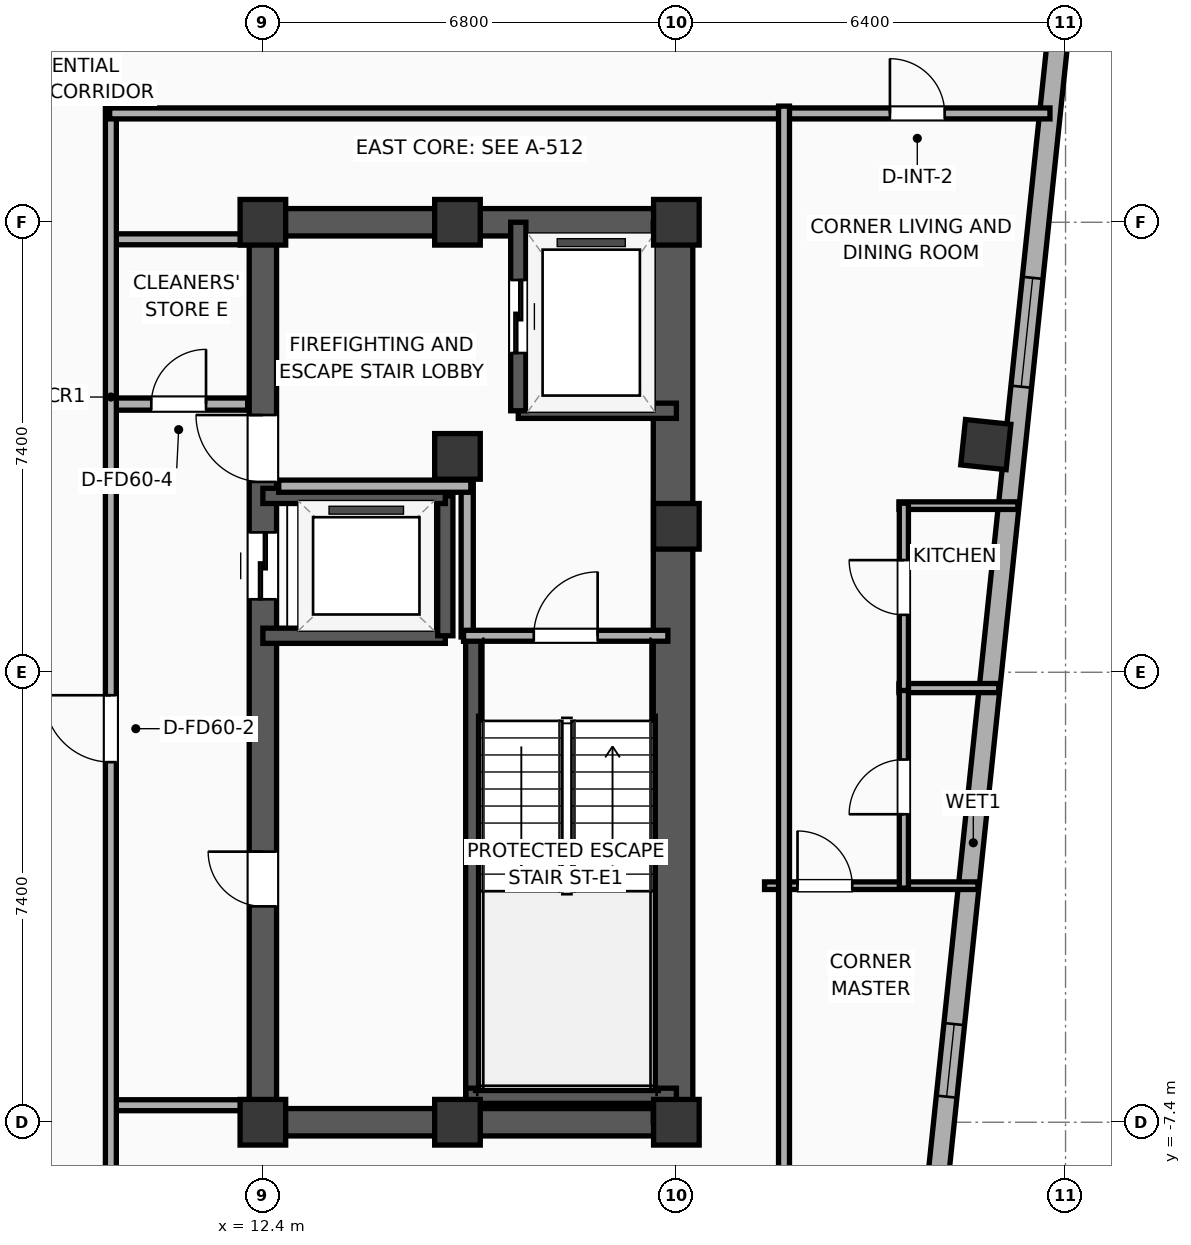
"""IFC4 building model, lengths in metres.
Left out: names, types, materials, properties, quantities, classifications, styles, units other than length and angle.
Written with IfcOpenShell. Run it as: python <this file> out.ifc"""

import sys

from ifc_helpers import new_model, si_unit, direction, frame, frame_2d, origin, origin_2d, place, context, subcontext, project, spatial, rectangle, hollow_rectangle, extrude, element, fill, save


model = new_model("IFC4")
c1 = context("Model", 3, precision=1e-05, world=origin(), true_north=direction((0.0, 1.0)))
c2 = subcontext(c1, "Body", "Model", "MODEL_VIEW")
j1 = project(units=[si_unit("LENGTHUNIT", "METRE"), si_unit("PLANEANGLEUNIT", "RADIAN")], contexts=[c1])
p1 = place(None, origin())
s1 = spatial("IfcSite", under=j1, at=p1, CompositionType="ELEMENT")
p2 = place(p1, origin())
s2 = spatial("IfcBuilding", under=s1, at=p2, CompositionType="ELEMENT")
p3 = place(p2, frame((0.0, 0.0, 279.5)))
s3 = spatial("IfcBuildingStorey", under=s2, at=p3, CompositionType="ELEMENT", Elevation=279.5)
for number, where, z_axis, x_axis in (
    (1, (12.4, -7.4, 0.0), (0.0, 0.0, 1.0), (1.0, 0.0, 0.0)),
    (2, (15.6, 3.55, 0.0), (0.0, 0.0, 1.0), (1.0, 0.0, 0.0)),
    (3, (12.4, 7.4, 0.0), (0.0, 0.0, 1.0), (1.0, 0.0, 0.0)),
    (4, (15.6, -7.4, 0.0), (0.0, 0.0, 1.0), (1.0, 0.0, 0.0)),
    (5, (15.6, 7.4, 0.0), (0.0, 0.0, 1.0), (1.0, 0.0, 0.0)),
    (6, (19.2, -7.4, 0.0), (0.0, 0.0, 1.0), (1.0, 0.0, 0.0)),
    (7, (19.2, 2.4, 0.0), (0.0, 0.0, 1.0), (1.0, 0.0, 0.0)),
    (8, (19.2, 7.4, 0.0), (0.0, 0.0, 1.0), (1.0, 0.0, 0.0)),
):
    element("IfcColumn", number, at=place(p3, frame(where, z_axis=z_axis, x_axis=x_axis)), inside=s3, PredefinedType="COLUMN", context=c2, shape_type="SweptSolid", body=[
        extrude(rectangle(XDim=0.75, YDim=0.75, at=origin_2d()), origin(), (0.0, 0.0, 1.0), 3.9),
    ])
for number, where, z_axis, x_axis in (
    (9, (12.175, -7.4, 0.0), (0.0, 0.0, 1.0), (1.0, 0.0, 0.0)),
    (10, (12.175, 7.4, 0.0), (0.0, 0.0, 1.0), (1.0, 0.0, 0.0)),
):
    element("IfcWall", number, at=place(p3, frame(where, z_axis=z_axis, x_axis=x_axis)), inside=s3, PredefinedType="SHEAR", context=c2, shape_type="SweptSolid", body=[
        extrude(rectangle(XDim=7.25, YDim=0.45, at=frame_2d((3.625, 0.0))), origin(), (0.0, 0.0, 1.0), 3.65),
    ])
p4 = place(p3, frame((12.4, -7.4, 0.0), z_axis=(0.0, 0.0, 1.0), x_axis=(0.0, 1.0, 0.0)))
e11 = element("IfcWall", 11, at=p4, inside=s3, PredefinedType="SHEAR", context=c2, shape_type="SweptSolid", body=[
    extrude(rectangle(XDim=14.8, YDim=0.45, at=frame_2d((7.4, 0.0))), origin(), (0.0, 0.0, 1.0), 3.65),
])
p5 = place(p4, frame((8.6, 0.0, 0.0)))
e12 = element("IfcOpeningElement", 12, at=p5, cuts=e11, PredefinedType="OPENING", context=c2, shape_type="SweptSolid", body=[
    extrude(rectangle(XDim=1.1, YDim=2.05, at=frame_2d((0.55, 1.025))), frame((0.0, 0.235, 0.0), z_axis=(0.0, -1.0, 0.0), x_axis=(1.0, 0.0, 0.0)), (0.0, 0.0, 1.0), 0.47),
])
p6 = place(p4, frame((10.53, 0.0, 0.0)))
e13 = element("IfcOpeningElement", 13, at=p6, cuts=e11, PredefinedType="OPENING", context=c2, shape_type="SweptSolid", body=[
    extrude(rectangle(XDim=1.1, YDim=2.05, at=frame_2d((0.55, 1.025))), frame((0.0, 0.235, 0.0), z_axis=(0.0, -1.0, 0.0), x_axis=(1.0, 0.0, 0.0)), (0.0, 0.0, 1.0), 0.47),
])
p7 = place(p4, frame((3.55, 0.0, 0.0)))
e14 = element("IfcOpeningElement", 14, at=p7, cuts=e11, PredefinedType="OPENING", context=c2, shape_type="SweptSolid", body=[
    extrude(rectangle(XDim=0.9, YDim=2.05, at=frame_2d((0.45, 1.025))), frame((0.0, 0.235, 0.0), z_axis=(0.0, -1.0, 0.0), x_axis=(1.0, 0.0, 0.0)), (0.0, 0.0, 1.0), 0.47),
])
p8 = place(p3, frame((19.145, -7.4, 0.0), z_axis=(0.0, 0.0, 1.0), x_axis=(0.0, 1.0, 0.0)))
e15 = element("IfcWall", 15, at=p8, inside=s3, PredefinedType="SHEAR", context=c2, shape_type="SweptSolid", body=[
    extrude(rectangle(XDim=14.8, YDim=0.65, at=frame_2d((7.4, 0.0))), origin(), (0.0, 0.0, 1.0), 3.65),
])
p9 = place(p3, frame((15.86, -7.085, 0.0), z_axis=(0.0, 0.0, 1.0), x_axis=(0.0, 1.0, 0.0)))
e16 = element("IfcWall", 16, at=p9, inside=s3, PredefinedType="SOLIDWALL", context=c2, shape_type="SweptSolid", body=[
    extrude(rectangle(XDim=7.685, YDim=0.25, at=frame_2d((3.843, 0.0))), origin(), (0.0, 0.0, 1.0), 3.65),
])
p10 = place(p3, frame((15.74, -6.965, 0.0), z_axis=(0.0, 0.0, 1.0), x_axis=(1.0, 0.0, 0.0)))
e17 = element("IfcWall", 17, at=p10, inside=s3, PredefinedType="SOLIDWALL", context=c2, shape_type="SweptSolid", body=[
    extrude(rectangle(XDim=3.46, YDim=0.25, at=frame_2d((1.73, 0.0))), origin(), (0.0, 0.0, 1.0), 3.65),
])
p11 = place(p3, frame((24.289, 3.744, 0.0), z_axis=(0.0, 0.0, 1.0), x_axis=(0.994521895368, -0.104528463268, 0.0)))
e18 = element("IfcColumn", 18, at=p11, inside=s3, PredefinedType="COLUMN", context=c2, shape_type="SweptSolid", body=[
    extrude(hollow_rectangle(XDim=0.75, YDim=0.75, WallThickness=0.025, at=origin_2d()), origin(), (0.0, 0.0, 1.0), 3.9),
])
p12 = place(p3, frame((25.67, 12.296, 0.0), z_axis=(0.0, 0.0, 1.0), x_axis=(-0.104533282919, -0.994521388791, 0.0)))
e19 = element("IfcWall", 19, at=p12, inside=s3, PredefinedType="ELEMENTEDWALL", context=c2, shape_type="SweptSolid", body=[
    extrude(rectangle(XDim=30.366, YDim=0.34, at=frame_2d((15.183, 0.0))), origin(), (0.0, 0.0, 1.0), 3.65),
])
p13 = place(p12, frame((5.842, 0.0, 0.75)))
e20 = element("IfcOpeningElement", 20, at=p13, cuts=e19, PredefinedType="OPENING", context=c2, shape_type="SweptSolid", body=[
    extrude(rectangle(XDim=1.8, YDim=2.1, at=frame_2d((0.9, 1.05))), frame((0.0, 0.18, 0.0), z_axis=(0.0, -1.0, 0.0), x_axis=(1.0, 0.0, 0.0)), (0.0, 0.0, 1.0), 0.36),
])
p14 = place(p12, frame((23.525, 0.0, 0.75)))
e21 = element("IfcOpeningElement", 21, at=p14, cuts=e19, PredefinedType="OPENING", context=c2, shape_type="SweptSolid", body=[
    extrude(rectangle(XDim=1.8, YDim=2.1, at=frame_2d((0.9, 1.05))), frame((0.0, 0.18, 0.0), z_axis=(0.0, -1.0, 0.0), x_axis=(1.0, 0.0, 0.0)), (0.0, 0.0, 1.0), 0.36),
])
p15 = place(p12, frame((27.368, 0.0, 0.75)))
e22 = element("IfcOpeningElement", 22, at=p15, cuts=e19, PredefinedType="OPENING", context=c2, shape_type="SweptSolid", body=[
    extrude(rectangle(XDim=1.2, YDim=2.05, at=frame_2d((0.6, 1.025))), frame((0.0, 0.18, 0.0), z_axis=(0.0, -1.0, 0.0), x_axis=(1.0, 0.0, 0.0)), (0.0, 0.0, 1.0), 0.36),
])
p16 = place(p12, frame((18.181, 0.0, 0.75)))
e23 = element("IfcOpeningElement", 23, at=p16, cuts=e19, PredefinedType="OPENING", context=c2, shape_type="SweptSolid", body=[
    extrude(rectangle(XDim=1.2, YDim=2.05, at=frame_2d((0.6, 1.025))), frame((0.0, 0.18, 0.0), z_axis=(0.0, -1.0, 0.0), x_axis=(1.0, 0.0, 0.0)), (0.0, 0.0, 1.0), 0.36),
])
p17 = place(p3, frame((16.6, 4.3, 0.0), z_axis=(0.0, 0.0, 1.0), x_axis=(1.0, 0.0, 0.0)))
e24 = element("IfcWall", 24, at=p17, inside=s3, PredefinedType="SOLIDWALL", context=c2, shape_type="SweptSolid", body=[
    extrude(rectangle(XDim=2.6, YDim=0.25, at=frame_2d((1.3, 0.0))), origin(), (0.0, 0.0, 1.0), 3.65),
])
p18 = place(p3, frame((16.6, 7.4, 0.0), z_axis=(0.0, 0.0, 1.0), x_axis=(0.0, -1.0, 0.0)))
e25 = element("IfcWall", 25, at=p18, inside=s3, PredefinedType="SOLIDWALL", context=c2, shape_type="SweptSolid", body=[
    extrude(rectangle(XDim=3.1, YDim=0.25, at=frame_2d((1.55, 0.0))), origin(), (0.0, 0.0, 1.0), 3.65),
])
p19 = place(p18, frame((0.95, 0.0, 0.0)))
e26 = element("IfcOpeningElement", 26, at=p19, cuts=e25, PredefinedType="OPENING", context=c2, shape_type="SweptSolid", body=[
    extrude(rectangle(XDim=1.2, YDim=2.05, at=frame_2d((0.6, 1.025))), frame((0.0, 0.135, 0.0), z_axis=(0.0, -1.0, 0.0), x_axis=(1.0, 0.0, 0.0)), (0.0, 0.0, 1.0), 0.27),
])
p20 = place(p3, frame((12.4, 0.6, 0.0), z_axis=(0.0, 0.0, 1.0), x_axis=(1.0, 0.0, 0.0)))
e27 = element("IfcWall", 27, at=p20, inside=s3, PredefinedType="SOLIDWALL", context=c2, shape_type="SweptSolid", body=[
    extrude(rectangle(XDim=3.0, YDim=0.25, at=frame_2d((1.5, 0.0))), origin(), (0.0, 0.0, 1.0), 3.65),
])
p21 = place(p3, frame((15.4, 0.6, 0.0), z_axis=(0.0, 0.0, 1.0), x_axis=(0.0, 1.0, 0.0)))
e28 = element("IfcWall", 28, at=p21, inside=s3, PredefinedType="SOLIDWALL", context=c2, shape_type="SweptSolid", body=[
    extrude(rectangle(XDim=2.3, YDim=0.25, at=frame_2d((1.15, 0.0))), origin(), (0.0, 0.0, 1.0), 3.65),
])
p22 = place(p3, frame((15.4, 2.9, 0.0), z_axis=(0.0, 0.0, 1.0), x_axis=(-1.0, 0.0, 0.0)))
e29 = element("IfcWall", 29, at=p22, inside=s3, PredefinedType="SOLIDWALL", context=c2, shape_type="SweptSolid", body=[
    extrude(rectangle(XDim=3.0, YDim=0.25, at=frame_2d((1.5, 0.0))), origin(), (0.0, 0.0, 1.0), 3.65),
])
p23 = place(p3, frame((15.76, 0.58, 0.0), z_axis=(0.0, 0.0, 1.0), x_axis=(0.0, 1.0, 0.0)))
e30 = element("IfcWall", 30, at=p23, inside=s3, PredefinedType="PARTITIONING", context=c2, shape_type="SweptSolid", body=[
    extrude(rectangle(XDim=2.52, YDim=0.2, at=frame_2d((1.26, 0.0))), origin(), (0.0, 0.0, 1.0), 3.65),
])
p24 = place(p3, frame((12.66, 3.06, 0.0), z_axis=(0.0, 0.0, 1.0), x_axis=(1.0, 0.0, 0.0)))
e31 = element("IfcWall", 31, at=p24, inside=s3, PredefinedType="PARTITIONING", context=c2, shape_type="SweptSolid", body=[
    extrude(rectangle(XDim=3.16, YDim=0.2, at=frame_2d((1.58, 0.0))), origin(), (0.0, 0.0, 1.0), 3.65),
])
p25 = place(p3, frame((15.7, 0.6, 0.0), z_axis=(0.0, 0.0, 1.0), x_axis=(1.0, 0.0, 0.0)))
e32 = element("IfcWall", 32, at=p25, inside=s3, PredefinedType="PARTITIONING", context=c2, shape_type="SweptSolid", body=[
    extrude(rectangle(XDim=3.36, YDim=0.18, at=frame_2d((1.68, 0.0))), origin(), (0.0, 0.0, 1.0), 3.65),
])
p26 = place(p25, frame((1.155, 0.0, 0.0)))
e33 = element("IfcOpeningElement", 33, at=p26, cuts=e32, PredefinedType="OPENING", context=c2, shape_type="SweptSolid", body=[
    extrude(rectangle(XDim=1.05, YDim=2.05, at=frame_2d((0.525, 1.025))), frame((0.0, 0.1, 0.0), z_axis=(0.0, -1.0, 0.0), x_axis=(1.0, 0.0, 0.0)), (0.0, 0.0, 1.0), 0.2),
])
p27 = place(p3, frame((9.88, 4.41, 0.0), z_axis=(0.0, 0.0, 1.0), x_axis=(1.0, 0.0, 0.0)))
e34 = element("IfcWall", 34, at=p27, inside=s3, PredefinedType="PARTITIONING", context=c2, shape_type="SweptSolid", body=[
    extrude(rectangle(XDim=2.27, YDim=0.2, at=frame_2d((1.135, 0.0))), origin(), (0.0, 0.0, 1.0), 3.65),
])
p28 = place(p27, frame((0.685, 0.0, 0.0)))
e35 = element("IfcOpeningElement", 35, at=p28, cuts=e34, PredefinedType="OPENING", context=c2, shape_type="SweptSolid", body=[
    extrude(rectangle(XDim=0.9, YDim=2.05, at=frame_2d((0.45, 1.025))), frame((0.0, 0.11, 0.0), z_axis=(0.0, -1.0, 0.0), x_axis=(1.0, 0.0, 0.0)), (0.0, 0.0, 1.0), 0.22),
])
for number, where, z_axis, x_axis in (
    (36, (9.88, 7.12, 0.0), (0.0, 0.0, 1.0), (1.0, 0.0, 0.0)),
    (37, (9.88, -7.12, 0.0), (0.0, 0.0, 1.0), (1.0, 0.0, 0.0)),
):
    element("IfcWall", number, at=place(p3, frame(where, z_axis=z_axis, x_axis=x_axis)), inside=s3, PredefinedType="PARTITIONING", context=c2, shape_type="SweptSolid", body=[
        extrude(rectangle(XDim=2.27, YDim=0.18, at=frame_2d((1.135, 0.0))), origin(), (0.0, 0.0, 1.0), 3.65),
    ])
p29 = place(p3, frame((9.9, -9.28, 0.0), z_axis=(0.0, 0.0, 1.0), x_axis=(0.0, 1.0, 0.0)))
e38 = element("IfcWall", 38, at=p29, inside=s3, PredefinedType="PARTITIONING", context=c2, shape_type="SweptSolid", body=[
    extrude(rectangle(XDim=18.56, YDim=0.18, at=frame_2d((9.28, 0.0))), origin(), (0.0, 0.0, 1.0), 3.65),
])
p30 = place(p29, frame((7.802, 0.0, 0.0)))
e39 = element("IfcOpeningElement", 39, at=p30, cuts=e38, PredefinedType="OPENING", context=c2, shape_type="SweptSolid", body=[
    extrude(rectangle(XDim=1.1, YDim=2.05, at=frame_2d((0.55, 1.025))), frame((0.0, 0.1, 0.0), z_axis=(0.0, -1.0, 0.0), x_axis=(1.0, 0.0, 0.0)), (0.0, 0.0, 1.0), 0.2),
])
p31 = place(p3, frame((9.88, 9.19, 0.0), z_axis=(0.0, 0.0, 1.0), x_axis=(1.0, 0.0, 0.0)))
e40 = element("IfcWall", 40, at=p31, inside=s3, PredefinedType="PARTITIONING", context=c2, shape_type="SweptSolid", body=[
    extrude(rectangle(XDim=15.464, YDim=0.18, at=frame_2d((7.732, 0.0))), origin(), (0.0, 0.0, 1.0), 3.65),
])
p32 = place(p31, frame((12.832, 0.0, 0.0)))
e41 = element("IfcOpeningElement", 41, at=p32, cuts=e40, PredefinedType="OPENING", context=c2, shape_type="SweptSolid", body=[
    extrude(rectangle(XDim=0.9, YDim=2.05, at=frame_2d((0.45, 1.025))), frame((0.0, 0.1, 0.0), z_axis=(0.0, -1.0, 0.0), x_axis=(1.0, 0.0, 0.0)), (0.0, 0.0, 1.0), 0.2),
])
p33 = place(p3, frame((22.861, 2.74, 0.0), z_axis=(0.0, 0.0, 1.0), x_axis=(1.0, 0.0, 0.0)))
e42 = element("IfcWall", 42, at=p33, inside=s3, PredefinedType="PARTITIONING", context=c2, shape_type="SweptSolid", body=[
    extrude(rectangle(XDim=1.956, YDim=0.125, at=frame_2d((0.978, 0.0))), origin(), (0.0, 0.0, 1.0), 3.65),
])
p34 = place(p3, frame((22.861, -0.26, 0.0), z_axis=(0.0, 0.0, 1.0), x_axis=(1.0, 0.0, 0.0)))
e43 = element("IfcWall", 43, at=p34, inside=s3, PredefinedType="PLUMBINGWALL", context=c2, shape_type="SweptSolid", body=[
    extrude(rectangle(XDim=1.64, YDim=0.15, at=frame_2d((0.82, 0.0))), origin(), (0.0, 0.0, 1.0), 3.65),
])
p35 = place(p3, frame((20.65, -3.51, 0.0), z_axis=(0.0, 0.0, 1.0), x_axis=(1.0, 0.0, 0.0)))
e44 = element("IfcWall", 44, at=p35, inside=s3, PredefinedType="PARTITIONING", context=c2, shape_type="SweptSolid", body=[
    extrude(rectangle(XDim=3.51, YDim=0.125, at=frame_2d((1.755, 0.0))), origin(), (0.0, 0.0, 1.0), 3.65),
])
p36 = place(p35, frame((0.542, 0.0, 0.0)))
e45 = element("IfcOpeningElement", 45, at=p36, cuts=e44, PredefinedType="OPENING", context=c2, shape_type="SweptSolid", body=[
    extrude(rectangle(XDim=0.9, YDim=2.05, at=frame_2d((0.45, 1.025))), frame((0.0, 0.073, 0.0), z_axis=(0.0, -1.0, 0.0), x_axis=(1.0, 0.0, 0.0)), (0.0, 0.0, 1.0), 0.145),
])
p37 = place(p3, frame((22.941, -3.55, 0.0), z_axis=(0.0, 0.0, 1.0), x_axis=(0.0, 1.0, 0.0)))
e46 = element("IfcWall", 46, at=p37, inside=s3, PredefinedType="PLUMBINGWALL", context=c2, shape_type="SweptSolid", body=[
    extrude(rectangle(XDim=3.33, YDim=0.15, at=frame_2d((1.665, 0.0))), origin(), (0.0, 0.0, 1.0), 3.65),
])
p38 = place(p37, frame((1.215, 0.0, 0.0)))
e47 = element("IfcOpeningElement", 47, at=p38, cuts=e46, PredefinedType="OPENING", context=c2, shape_type="SweptSolid", body=[
    extrude(rectangle(XDim=0.9, YDim=2.05, at=frame_2d((0.45, 1.025))), frame((0.0, 0.085, 0.0), z_axis=(0.0, -1.0, 0.0), x_axis=(1.0, 0.0, 0.0)), (0.0, 0.0, 1.0), 0.17),
])
p39 = place(p3, frame((22.941, -0.3, 0.0), z_axis=(0.0, 0.0, 1.0), x_axis=(0.0, 1.0, 0.0)))
e48 = element("IfcWall", 48, at=p39, inside=s3, PredefinedType="PLUMBINGWALL", context=c2, shape_type="SweptSolid", body=[
    extrude(rectangle(XDim=3.08, YDim=0.15, at=frame_2d((1.54, 0.0))), origin(), (0.0, 0.0, 1.0), 3.65),
])
p40 = place(p39, frame((1.244, 0.0, 0.0)))
e49 = element("IfcOpeningElement", 49, at=p40, cuts=e48, PredefinedType="OPENING", context=c2, shape_type="SweptSolid", body=[
    extrude(rectangle(XDim=0.9, YDim=2.05, at=frame_2d((0.45, 1.025))), frame((0.0, 0.085, 0.0), z_axis=(0.0, -1.0, 0.0), x_axis=(1.0, 0.0, 0.0)), (0.0, 0.0, 1.0), 0.17),
])
p41 = place(p3, frame((20.97, -9.31, 0.0), z_axis=(0.0, 0.0, 1.0), x_axis=(0.0, 1.0, 0.0)))
e50 = element("IfcWall", 50, at=p41, inside=s3, PredefinedType="PARTITIONING", context=c2, shape_type="SweptSolid", body=[
    extrude(rectangle(XDim=18.62, YDim=0.18, at=frame_2d((9.31, 0.0))), origin(), (0.0, 0.0, 1.0), 3.65),
])
p42 = place(p13, origin())
e51 = element("IfcWindow", 51, at=p42, inside=s3, PartitioningType="SINGLE_PANEL", PredefinedType="WINDOW", context=c2, shape_type="SweptSolid", body=[
    extrude(rectangle(XDim=1.8, YDim=2.1, at=frame_2d((0.9, 1.05))), frame((0.0, 0.03, 0.0), z_axis=(0.0, -1.0, 0.0), x_axis=(1.0, 0.0, 0.0)), (0.0, 0.0, 1.0), 0.06),
])
fill(e20, e51)
p43 = place(p16, origin())
e52 = element("IfcWindow", 52, at=p43, inside=s3, PartitioningType="SINGLE_PANEL", PredefinedType="WINDOW", context=c2, shape_type="SweptSolid", body=[
    extrude(rectangle(XDim=1.2, YDim=2.05, at=frame_2d((0.6, 1.025))), frame((0.0, 0.03, 0.0), z_axis=(0.0, -1.0, 0.0), x_axis=(1.0, 0.0, 0.0)), (0.0, 0.0, 1.0), 0.06),
])
fill(e23, e52)
p44 = place(p19, origin())
e53 = element("IfcDoor", 53, at=p44, inside=s3, OperationType="SLIDING_TO_LEFT", PredefinedType="DOOR", context=c2, shape_type="SweptSolid", body=[
    extrude(rectangle(XDim=1.2, YDim=2.05, at=frame_2d((0.6, 1.025))), frame((0.0, 0.025, 0.0), z_axis=(0.0, -1.0, 0.0), x_axis=(1.0, 0.0, 0.0)), (0.0, 0.0, 1.0), 0.05),
])
fill(e26, e53)
p45 = place(p5, origin())
e54 = element("IfcDoor", 54, at=p45, inside=s3, OperationType="SLIDING_TO_LEFT", PredefinedType="DOOR", context=c2, shape_type="SweptSolid", body=[
    extrude(rectangle(XDim=1.1, YDim=2.05, at=frame_2d((0.55, 1.025))), frame((0.0, 0.025, 0.0), z_axis=(0.0, -1.0, 0.0), x_axis=(1.0, 0.0, 0.0)), (0.0, 0.0, 1.0), 0.05),
])
fill(e12, e54)
p46 = place(p26, origin())
e55 = element("IfcDoor", 55, at=p46, inside=s3, OperationType="SINGLE_SWING_RIGHT", PredefinedType="DOOR", context=c2, shape_type="SweptSolid", body=[
    extrude(rectangle(XDim=1.05, YDim=2.05, at=frame_2d((0.525, 1.025))), frame((0.0, 0.025, 0.0), z_axis=(0.0, -1.0, 0.0), x_axis=(1.0, 0.0, 0.0)), (0.0, 0.0, 1.0), 0.05),
])
fill(e33, e55)
p47 = place(p28, origin())
e56 = element("IfcDoor", 56, at=p47, inside=s3, OperationType="SINGLE_SWING_RIGHT", PredefinedType="DOOR", context=c2, shape_type="SweptSolid", body=[
    extrude(rectangle(XDim=0.9, YDim=2.05, at=frame_2d((0.45, 1.025))), frame((0.0, 0.025, 0.0), z_axis=(0.0, -1.0, 0.0), x_axis=(1.0, 0.0, 0.0)), (0.0, 0.0, 1.0), 0.05),
])
fill(e35, e56)
p48 = place(p30, origin())
e57 = element("IfcDoor", 57, at=p48, inside=s3, OperationType="SINGLE_SWING_RIGHT", PredefinedType="DOOR", context=c2, shape_type="SweptSolid", body=[
    extrude(rectangle(XDim=1.1, YDim=2.05, at=frame_2d((0.55, 1.025))), frame((0.0, 0.025, 0.0), z_axis=(0.0, -1.0, 0.0), x_axis=(1.0, 0.0, 0.0)), (0.0, 0.0, 1.0), 0.05),
])
fill(e39, e57)
p49 = place(p32, origin())
e58 = element("IfcDoor", 58, at=p49, inside=s3, OperationType="SINGLE_SWING_LEFT", PredefinedType="DOOR", context=c2, shape_type="SweptSolid", body=[
    extrude(rectangle(XDim=0.9, YDim=2.05, at=frame_2d((0.45, 1.025))), frame((0.0, 0.025, 0.0), z_axis=(0.0, -1.0, 0.0), x_axis=(1.0, 0.0, 0.0)), (0.0, 0.0, 1.0), 0.05),
])
fill(e41, e58)
p50 = place(p36, origin())
e59 = element("IfcDoor", 59, at=p50, inside=s3, OperationType="SINGLE_SWING_LEFT", PredefinedType="DOOR", context=c2, shape_type="SweptSolid", body=[
    extrude(rectangle(XDim=0.9, YDim=2.05, at=frame_2d((0.45, 1.025))), frame((0.0, 0.025, 0.0), z_axis=(0.0, -1.0, 0.0), x_axis=(1.0, 0.0, 0.0)), (0.0, 0.0, 1.0), 0.05),
])
fill(e45, e59)
p51 = place(p38, origin())
e60 = element("IfcDoor", 60, at=p51, inside=s3, OperationType="SINGLE_SWING_LEFT", PredefinedType="DOOR", context=c2, shape_type="SweptSolid", body=[
    extrude(rectangle(XDim=0.9, YDim=2.05, at=frame_2d((0.45, 1.025))), frame((0.0, 0.025, 0.0), z_axis=(0.0, -1.0, 0.0), x_axis=(1.0, 0.0, 0.0)), (0.0, 0.0, 1.0), 0.05),
])
fill(e47, e60)
p52 = place(p40, origin())
e61 = element("IfcDoor", 61, at=p52, inside=s3, OperationType="SINGLE_SWING_RIGHT", PredefinedType="DOOR", context=c2, shape_type="SweptSolid", body=[
    extrude(rectangle(XDim=0.9, YDim=2.05, at=frame_2d((0.45, 1.025))), frame((0.0, 0.025, 0.0), z_axis=(0.0, -1.0, 0.0), x_axis=(1.0, 0.0, 0.0)), (0.0, 0.0, 1.0), 0.05),
])
fill(e49, e61)
p53 = place(p6, origin())
e62 = element("IfcDoor", 62, at=p53, inside=s3, OperationType="SINGLE_SWING_RIGHT", PredefinedType="DOOR", context=c2, shape_type="SweptSolid", body=[
    extrude(rectangle(XDim=1.1, YDim=2.05, at=frame_2d((0.55, 1.025))), frame((0.0, 0.025, 0.0), z_axis=(0.0, -1.0, 0.0), x_axis=(1.0, 0.0, 0.0)), (0.0, 0.0, 1.0), 0.05),
])
fill(e13, e62)
p54 = place(p7, origin())
e63 = element("IfcDoor", 63, at=p54, inside=s3, OperationType="SINGLE_SWING_RIGHT", PredefinedType="DOOR", context=c2, shape_type="SweptSolid", body=[
    extrude(rectangle(XDim=0.9, YDim=2.05, at=frame_2d((0.45, 1.025))), frame((0.0, 0.025, 0.0), z_axis=(0.0, -1.0, 0.0), x_axis=(1.0, 0.0, 0.0)), (0.0, 0.0, 1.0), 0.05),
])
fill(e14, e63)
save(model, sys.argv[1])
